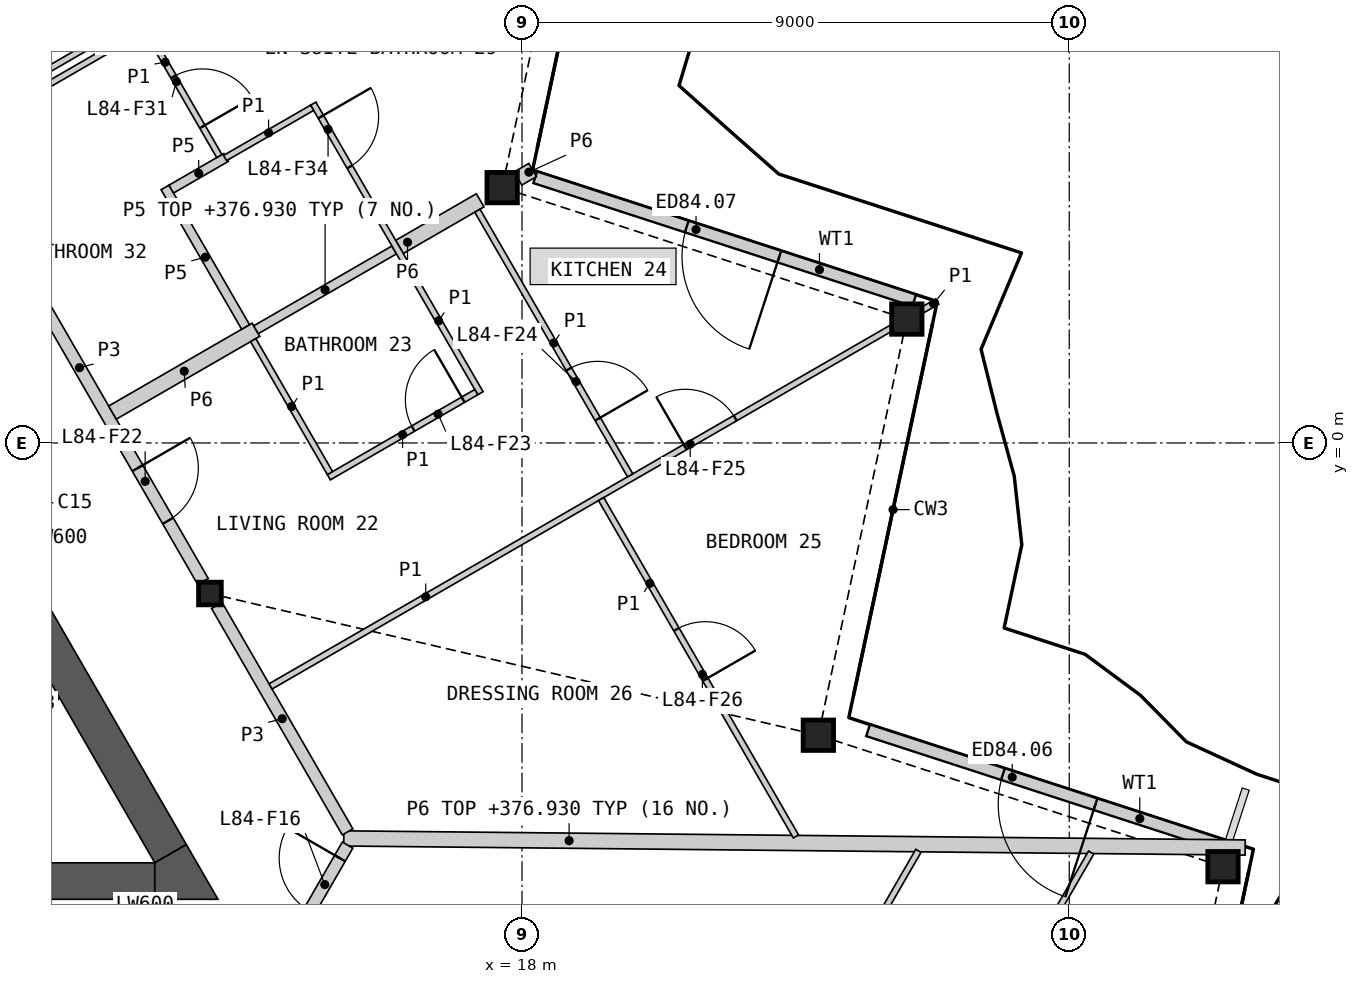
"""IFC4 building model, lengths in metres.
Left out: names, types, materials, properties, quantities, classifications, styles, units other than length and angle.
Written with IfcOpenShell. Run it as: python <this file> out.ifc"""

import sys

from ifc_helpers import new_model, si_unit, direction, frame, frame_2d, origin, origin_2d, place, context, subcontext, project, spatial, polyline, rectangle, hollow_rectangle, i_section, outline, extrude, element, fill, save


model = new_model("IFC4")
c1 = context("Model", 3, precision=1e-05, world=origin(), true_north=direction((0.0, 1.0)))
c2 = subcontext(c1, "Body", "Model", "MODEL_VIEW")
j1 = project(units=[si_unit("LENGTHUNIT", "METRE"), si_unit("PLANEANGLEUNIT", "RADIAN")], contexts=[c1])
p1 = place(None, origin())
s1 = spatial("IfcSite", under=j1, at=p1, CompositionType="ELEMENT")
p2 = place(p1, origin())
s2 = spatial("IfcBuilding", under=s1, at=p2, CompositionType="ELEMENT")
p3 = place(p2, frame((0.0, 0.0, 374.6)))
s3 = spatial("IfcBuildingStorey", under=s2, at=p3, CompositionType="ELEMENT", Elevation=374.6)
for number, where, z_axis, x_axis in (
    (1, (29.529, -6.969, 0.0), (0.0, 0.0, 1.0), (1.0, 0.0, 0.0)),
    (2, (22.874, -4.807, 0.0), (0.0, 0.0, 1.0), (1.0, 0.0, 0.0)),
    (3, (24.329, 2.037, 0.0), (0.0, 0.0, 1.0), (1.0, 0.0, 0.0)),
    (4, (17.674, 4.199, 0.0), (0.0, 0.0, 1.0), (1.0, 0.0, 0.0)),
):
    element("IfcColumn", number, at=place(p3, frame(where, z_axis=z_axis, x_axis=x_axis)), inside=s3, PredefinedType="COLUMN", context=c2, shape_type="SweptSolid", body=[
        extrude(hollow_rectangle(XDim=0.5, YDim=0.5, WallThickness=0.03, at=origin_2d()), origin(), (0.0, 0.0, 1.0), 3.4),
    ])
p4 = place(p3, frame((12.868, -2.476, 0.0), z_axis=(0.0, 0.0, 1.0), x_axis=(1.0, 0.0, 0.0)))
e5 = element("IfcColumn", 5, at=p4, inside=s3, PredefinedType="COLUMN", context=c2, shape_type="SweptSolid", body=[
    extrude(i_section(OverallWidth=0.374, OverallDepth=0.372, WebThickness=0.016, FlangeThickness=0.026, at=origin_2d()), origin(), (0.0, 0.0, 1.0), 3.4),
])
p5 = place(p3, frame((29.65, -6.663, 0.0), z_axis=(0.0, 0.0, 1.0), x_axis=(-0.951056402988, 0.3090173431, 0.0)))
e6 = element("IfcWall", 6, at=p5, inside=s3, PredefinedType="SOLIDWALL", context=c2, shape_type="SweptSolid", body=[
    extrude(rectangle(XDim=6.265, YDim=0.2, at=frame_2d((3.133, 0.0))), origin(), (0.0, 0.0, 1.0), 2.634),
])
p6 = place(p5, frame((2.333, 0.0, 0.0)))
e7 = element("IfcOpeningElement", 7, at=p6, cuts=e6, PredefinedType="OPENING", context=c2, shape_type="SweptSolid", body=[
    extrude(rectangle(XDim=1.6, YDim=2.25, at=frame_2d((0.8, 1.125))), frame((0.0, 0.11, 0.0), z_axis=(0.0, -1.0, 0.0), x_axis=(1.0, 0.0, 0.0)), (0.0, 0.0, 1.0), 0.22),
])
p7 = place(p3, frame((24.45, 2.344, 0.0), z_axis=(0.0, 0.0, 1.0), x_axis=(-0.951062538214, 0.308998460199, 0.0)))
e8 = element("IfcWall", 8, at=p7, inside=s3, PredefinedType="SOLIDWALL", context=c2, shape_type="SweptSolid", body=[
    extrude(rectangle(XDim=6.553, YDim=0.2, at=frame_2d((3.277, 0.0))), origin(), (0.0, 0.0, 1.0), 2.634),
])
p8 = place(p7, frame((2.333, 0.0, 0.0)))
e9 = element("IfcOpeningElement", 9, at=p8, cuts=e8, PredefinedType="OPENING", context=c2, shape_type="SweptSolid", body=[
    extrude(rectangle(XDim=1.6, YDim=2.25, at=frame_2d((0.8, 1.125))), frame((0.0, 0.11, 0.0), z_axis=(0.0, -1.0, 0.0), x_axis=(1.0, 0.0, 0.0)), (0.0, 0.0, 1.0), 0.22),
])
p9 = place(p3, origin())
e10 = element("IfcWall", 10, at=p9, inside=s3, PredefinedType="SHEAR", context=c2, shape_type="SweptSolid", body=[
    extrude(outline(polyline([(8.83, -6.881), (10.374, -4.206), (10.032, -4.298), (8.738, -6.539), (8.83, -6.881)])), origin(), (0.0, 0.0, 1.0), 3.1),
])
p10 = place(p3, origin())
e11 = element("IfcWall", 11, at=p10, inside=s3, PredefinedType="SHEAR", context=c2, shape_type="SweptSolid", body=[
    extrude(outline(polyline([(10.032, -4.298), (10.374, -4.206), (5.307, -1.281), (5.182, -1.498), (10.032, -4.298)])), origin(), (0.0, 0.0, 1.0), 3.1),
])
p11 = place(p3, frame((-4.892, -7.206, 0.0), z_axis=(0.0, 0.0, 1.0), x_axis=(1.0, 0.0, 0.0)))
e12 = element("IfcWall", 12, at=p11, inside=s3, PredefinedType="SHEAR", context=c2, shape_type="SweptSolid", body=[
    extrude(rectangle(XDim=16.853, YDim=0.6, at=frame_2d((8.426, 0.0))), origin(), (0.0, 0.0, 1.0), 3.1),
])
p12 = place(p3, frame((12.221, -6.756, 0.0), z_axis=(0.0, 0.0, 1.0), x_axis=(-0.50000604952, 0.866021911064, 0.0)))
e13 = element("IfcWall", 13, at=p12, inside=s3, PredefinedType="SHEAR", context=c2, shape_type="SweptSolid", body=[
    extrude(rectangle(XDim=4.869, YDim=0.6, at=frame_2d((2.434, 0.0))), origin(), (0.0, 0.0, 1.0), 3.1),
])
p13 = place(p3, origin())
e14 = element("IfcWall", 14, at=p13, inside=s3, PredefinedType="SHEAR", context=c2, shape_type="SweptSolid", body=[
    extrude(outline(polyline([(11.961, -7.506), (11.961, -6.906), (12.48, -6.606), (13.0, -7.506), (11.961, -7.506)])), origin(), (0.0, 0.0, 1.0), 3.1),
])
p14 = place(p3, frame((15.069, -6.504, 0.0), z_axis=(0.0, 0.0, 1.0), x_axis=(0.999949045807, -0.01009483976, 0.0)))
e15 = element("IfcWall", 15, at=p14, inside=s3, PredefinedType="PARTITIONING", context=c2, shape_type="SweptSolid", body=[
    extrude(rectangle(XDim=14.825, YDim=0.25, at=frame_2d((7.413, 0.0))), origin(), (0.0, 0.0, 1.0), 2.33),
])
p15 = place(p3, frame((8.692, 4.756, 0.0), z_axis=(0.0, 0.0, 1.0), x_axis=(0.500001682468, -0.866024432409, 0.0)))
e16 = element("IfcWall", 16, at=p15, inside=s3, PredefinedType="PARTITIONING", context=c2, shape_type="SweptSolid", body=[
    extrude(rectangle(XDim=8.124, YDim=0.2, at=frame_2d((4.062, 0.0))), origin(), (0.0, 0.0, 1.0), 3.1),
])
p16 = place(p15, frame((5.97, 0.0, 0.0)))
e17 = element("IfcOpeningElement", 17, at=p16, cuts=e16, PredefinedType="OPENING", context=c2, shape_type="SweptSolid", body=[
    extrude(rectangle(XDim=1.0, YDim=2.1, at=frame_2d((0.5, 1.05))), frame((0.0, 0.11, 0.0), z_axis=(0.0, -1.0, 0.0), x_axis=(1.0, 0.0, 0.0)), (0.0, 0.0, 1.0), 0.22),
])
p17 = place(p3, frame((12.981, -2.673, 0.0), z_axis=(0.0, 0.0, 1.0), x_axis=(0.499986217557, -0.866033360935, 0.0)))
e18 = element("IfcWall", 18, at=p17, inside=s3, PredefinedType="PARTITIONING", context=c2, shape_type="SweptSolid", body=[
    extrude(rectangle(XDim=4.3, YDim=0.2, at=frame_2d((2.15, 0.0))), origin(), (0.0, 0.0, 1.0), 3.1),
])
p18 = place(p3, frame((13.293, -9.797, 0.0), z_axis=(0.0, 0.0, 1.0), x_axis=(0.499967746641, 0.866044024469, 0.0)))
e19 = element("IfcWall", 19, at=p18, inside=s3, PredefinedType="PARTITIONING", context=c2, shape_type="SweptSolid", body=[
    extrude(rectangle(XDim=3.676, YDim=0.2, at=frame_2d((1.838, 0.0))), origin(), (0.0, 0.0, 1.0), 3.1),
])
p19 = place(p18, frame((2.426, 0.0, 0.0)))
e20 = element("IfcOpeningElement", 20, at=p19, cuts=e19, PredefinedType="OPENING", context=c2, shape_type="SweptSolid", body=[
    extrude(rectangle(XDim=1.0, YDim=2.1, at=frame_2d((0.5, 1.05))), frame((0.0, 0.11, 0.0), z_axis=(0.0, -1.0, 0.0), x_axis=(1.0, 0.0, 0.0)), (0.0, 0.0, 1.0), 0.22),
])
p20 = place(p3, frame((11.265, 0.5, 0.0), z_axis=(0.0, 0.0, 1.0), x_axis=(0.866051307416, 0.49995513091, 0.0)))
e21 = element("IfcWall", 21, at=p20, inside=s3, PredefinedType="PARTITIONING", context=c2, shape_type="SweptSolid", body=[
    extrude(rectangle(XDim=2.725, YDim=0.25, at=frame_2d((1.362, 0.0))), origin(), (0.0, 0.0, 1.0), 2.33),
])
p21 = place(p3, frame((15.985, 3.224, 0.0), z_axis=(0.0, 0.0, 1.0), x_axis=(0.865989259495, 0.50006259852, 0.0)))
e22 = element("IfcWall", 22, at=p21, inside=s3, PredefinedType="PARTITIONING", context=c2, shape_type="SweptSolid", body=[
    extrude(rectangle(XDim=1.532, YDim=0.25, at=frame_2d((0.766, 0.0))), origin(), (0.0, 0.0, 1.0), 2.33),
])
p22 = place(p3, frame((17.934, 4.35, 0.0), z_axis=(0.0, 0.0, 1.0), x_axis=(0.866288059981, 0.499544789918, 0.0)))
e23 = element("IfcWall", 23, at=p22, inside=s3, PredefinedType="PARTITIONING", context=c2, shape_type="SweptSolid", body=[
    extrude(rectangle(XDim=0.278, YDim=0.25, at=frame_2d((0.139, 0.0))), origin(), (0.0, 0.0, 1.0), 2.33),
])
p23 = place(p3, frame((13.625, 1.862, 0.0), z_axis=(0.0, 0.0, 1.0), x_axis=(0.866013657776, 0.500020344131, 0.0)))
e24 = element("IfcWall", 24, at=p23, inside=s3, PredefinedType="PLUMBINGWALL", context=c2, shape_type="SweptSolid", body=[
    extrude(rectangle(XDim=2.625, YDim=0.15, at=frame_2d((1.312, 0.0))), origin(), (0.0, 0.0, 1.0), 2.33),
])
p24 = place(p3, frame((12.129, 4.203, 0.0), z_axis=(0.0, 0.0, 1.0), x_axis=(0.499993606316, -0.866029095148, 0.0)))
e25 = element("IfcWall", 25, at=p24, inside=s3, PredefinedType="PLUMBINGWALL", context=c2, shape_type="SweptSolid", body=[
    extrude(rectangle(XDim=2.65, YDim=0.15, at=frame_2d((1.325, 0.0))), origin(), (0.0, 0.0, 1.0), 2.33),
])
p25 = place(p3, frame((12.232, 4.175, 0.0), z_axis=(0.0, 0.0, 1.0), x_axis=(0.866056787991, 0.499945637019, 0.0)))
e26 = element("IfcWall", 26, at=p25, inside=s3, PredefinedType="PLUMBINGWALL", context=c2, shape_type="SweptSolid", body=[
    extrude(rectangle(XDim=1.042, YDim=0.15, at=frame_2d((0.521, 0.0))), origin(), (0.0, 0.0, 1.0), 2.33),
])
p26 = place(p3, frame((13.865, -4.004, 0.0), z_axis=(0.0, 0.0, 1.0), x_axis=(0.866023404247, 0.500003463284, 0.0)))
e27 = element("IfcWall", 27, at=p26, inside=s3, PredefinedType="PARTITIONING", context=c2, shape_type="SweptSolid", body=[
    extrude(rectangle(XDim=11.782, YDim=0.1, at=frame_2d((5.891, 0.0))), origin(), (0.0, 0.0, 1.0), 2.33),
])
p27 = place(p26, frame((7.874, 0.0, 0.0)))
e28 = element("IfcOpeningElement", 28, at=p27, cuts=e27, PredefinedType="OPENING", context=c2, shape_type="SweptSolid", body=[
    extrude(rectangle(XDim=0.95, YDim=2.1, at=frame_2d((0.475, 1.05))), frame((0.0, 0.06, 0.0), z_axis=(0.0, -1.0, 0.0), x_axis=(1.0, 0.0, 0.0)), (0.0, 0.0, 1.0), 0.12),
])
p28 = place(p3, frame((8.775, 5.066, 0.0), z_axis=(0.0, 0.0, 1.0), x_axis=(0.866023724155, 0.500002909193, 0.0)))
e29 = element("IfcWall", 29, at=p28, inside=s3, PredefinedType="PARTITIONING", context=c2, shape_type="SweptSolid", body=[
    extrude(rectangle(XDim=11.655, YDim=0.1, at=frame_2d((5.827, 0.0))), origin(), (0.0, 0.0, 1.0), 2.33),
])
p29 = place(p28, frame((3.751, 0.0, 0.0)))
e30 = element("IfcOpeningElement", 30, at=p29, cuts=e29, PredefinedType="OPENING", context=c2, shape_type="SweptSolid", body=[
    extrude(rectangle(XDim=0.95, YDim=2.1, at=frame_2d((0.475, 1.05))), frame((0.0, 0.06, 0.0), z_axis=(0.0, -1.0, 0.0), x_axis=(1.0, 0.0, 0.0)), (0.0, 0.0, 1.0), 0.12),
])
p30 = place(p3, frame((23.463, -13.488, 0.0), z_axis=(0.0, 0.0, 1.0), x_axis=(0.500012519194, 0.866018175704, 0.0)))
e31 = element("IfcWall", 31, at=p30, inside=s3, PredefinedType="PARTITIONING", context=c2, shape_type="SweptSolid", body=[
    extrude(rectangle(XDim=7.796, YDim=0.1, at=frame_2d((3.898, 0.0))), origin(), (0.0, 0.0, 1.0), 2.33),
])
p31 = place(p30, frame((3.473, 0.0, 0.0)))
e32 = element("IfcOpeningElement", 32, at=p31, cuts=e31, PredefinedType="OPENING", context=c2, shape_type="SweptSolid", body=[
    extrude(rectangle(XDim=0.95, YDim=2.1, at=frame_2d((0.475, 1.05))), frame((0.0, 0.06, 0.0), z_axis=(0.0, -1.0, 0.0), x_axis=(1.0, 0.0, 0.0)), (0.0, 0.0, 1.0), 0.12),
])
p32 = place(p3, frame((19.302, -0.923, 0.0), z_axis=(0.0, 0.0, 1.0), x_axis=(0.499999516514, -0.866025682925, 0.0)))
e33 = element("IfcWall", 33, at=p32, inside=s3, PredefinedType="PARTITIONING", context=c2, shape_type="SweptSolid", body=[
    extrude(rectangle(XDim=6.407, YDim=0.1, at=frame_2d((3.204, 0.0))), origin(), (0.0, 0.0, 1.0), 2.33),
])
p33 = place(p32, frame((2.476, 0.0, 0.0)))
e34 = element("IfcOpeningElement", 34, at=p33, cuts=e33, PredefinedType="OPENING", context=c2, shape_type="SweptSolid", body=[
    extrude(rectangle(XDim=0.95, YDim=2.1, at=frame_2d((0.475, 1.05))), frame((0.0, 0.06, 0.0), z_axis=(0.0, -1.0, 0.0), x_axis=(1.0, 0.0, 0.0)), (0.0, 0.0, 1.0), 0.12),
])
p34 = place(p3, frame((21.319, -12.251, 0.0), z_axis=(0.0, 0.0, 1.0), x_axis=(0.499999833739, 0.866025499775, 0.0)))
e35 = element("IfcWall", 35, at=p34, inside=s3, PredefinedType="PARTITIONING", context=c2, shape_type="SweptSolid", body=[
    extrude(rectangle(XDim=6.4, YDim=0.1, at=frame_2d((3.2, 0.0))), origin(), (0.0, 0.0, 1.0), 2.33),
])
p35 = place(p34, frame((1.26, 0.0, 0.0)))
e36 = element("IfcOpeningElement", 36, at=p35, cuts=e35, PredefinedType="OPENING", context=c2, shape_type="SweptSolid", body=[
    extrude(rectangle(XDim=0.95, YDim=2.1, at=frame_2d((0.475, 1.05))), frame((0.0, 0.06, 0.0), z_axis=(0.0, -1.0, 0.0), x_axis=(1.0, 0.0, 0.0)), (0.0, 0.0, 1.0), 0.12),
])
p36 = place(p3, frame((14.567, 5.581, 0.0), z_axis=(0.0, 0.0, 1.0), x_axis=(0.499996545922, -0.866027397988, 0.0)))
e37 = element("IfcWall", 37, at=p36, inside=s3, PredefinedType="PARTITIONING", context=c2, shape_type="SweptSolid", body=[
    extrude(rectangle(XDim=5.5, YDim=0.1, at=frame_2d((2.75, 0.0))), origin(), (0.0, 0.0, 1.0), 2.33),
])
p37 = place(p36, frame((0.25, 0.0, 0.0)))
e38 = element("IfcOpeningElement", 38, at=p37, cuts=e37, PredefinedType="OPENING", context=c2, shape_type="SweptSolid", body=[
    extrude(rectangle(XDim=0.95, YDim=2.1, at=frame_2d((0.475, 1.05))), frame((0.0, 0.06, 0.0), z_axis=(0.0, -1.0, 0.0), x_axis=(1.0, 0.0, 0.0)), (0.0, 0.0, 1.0), 0.12),
])
p38 = place(p3, frame((17.266, 3.82, 0.0), z_axis=(0.0, 0.0, 1.0), x_axis=(0.499990214365, -0.86603105345, 0.0)))
e39 = element("IfcWall", 39, at=p38, inside=s3, PredefinedType="PARTITIONING", context=c2, shape_type="SweptSolid", body=[
    extrude(rectangle(XDim=5.025, YDim=0.1, at=frame_2d((2.512, 0.0))), origin(), (0.0, 0.0, 1.0), 2.33),
])
p39 = place(p38, frame((3.008, 0.0, 0.0)))
e40 = element("IfcOpeningElement", 40, at=p39, cuts=e39, PredefinedType="OPENING", context=c2, shape_type="SweptSolid", body=[
    extrude(rectangle(XDim=0.95, YDim=2.1, at=frame_2d((0.475, 1.05))), frame((0.0, 0.06, 0.0), z_axis=(0.0, -1.0, 0.0), x_axis=(1.0, 0.0, 0.0)), (0.0, 0.0, 1.0), 0.12),
])
p40 = place(p3, frame((14.823, -0.564, 0.0), z_axis=(0.0, 0.0, 1.0), x_axis=(0.866034573852, 0.49998411664, 0.0)))
e41 = element("IfcWall", 41, at=p40, inside=s3, PredefinedType="PARTITIONING", context=c2, shape_type="SweptSolid", body=[
    extrude(rectangle(XDim=2.8, YDim=0.1, at=frame_2d((1.4, 0.0))), origin(), (0.0, 0.0, 1.0), 2.33),
])
p41 = place(p40, frame((1.6, 0.0, 0.0)))
e42 = element("IfcOpeningElement", 42, at=p41, cuts=e41, PredefinedType="OPENING", context=c2, shape_type="SweptSolid", body=[
    extrude(rectangle(XDim=0.95, YDim=2.1, at=frame_2d((0.475, 1.05))), frame((0.0, 0.06, 0.0), z_axis=(0.0, -1.0, 0.0), x_axis=(1.0, 0.0, 0.0)), (0.0, 0.0, 1.0), 0.12),
])
p42 = place(p3, frame((13.579, 1.691, 0.0), z_axis=(0.0, 0.0, 1.0), x_axis=(0.500048846702, -0.865997200291, 0.0)))
e43 = element("IfcWall", 43, at=p42, inside=s3, PredefinedType="PARTITIONING", context=c2, shape_type="SweptSolid", body=[
    extrude(rectangle(XDim=2.525, YDim=0.1, at=frame_2d((1.263, 0.0))), origin(), (0.0, 0.0, 1.0), 2.33),
])
p43 = place(p3, frame((8.488, 5.15, 0.0), z_axis=(0.0, 0.0, 1.0), x_axis=(0.866027727466, 0.499995975244, 0.0)))
e44 = element("IfcWall", 44, at=p43, inside=s3, PredefinedType="PARTITIONING", context=c2, shape_type="SweptSolid", body=[
    extrude(rectangle(XDim=2.73, YDim=0.1, at=frame_2d((1.365, 0.0))), origin(), (0.0, 0.0, 1.0), 2.33),
])
p44 = place(p3, frame((11.835, 6.775, 0.0), z_axis=(0.0, 0.0, 1.0), x_axis=(0.500030943131, -0.866007538022, 0.0)))
e45 = element("IfcWall", 45, at=p44, inside=s3, PredefinedType="PARTITIONING", context=c2, shape_type="SweptSolid", body=[
    extrude(rectangle(XDim=2.375, YDim=0.1, at=frame_2d((1.188, 0.0))), origin(), (0.0, 0.0, 1.0), 2.33),
])
p45 = place(p44, frame((0.867, 0.0, 0.0)))
e46 = element("IfcOpeningElement", 46, at=p45, cuts=e45, PredefinedType="OPENING", context=c2, shape_type="SweptSolid", body=[
    extrude(rectangle(XDim=0.95, YDim=2.1, at=frame_2d((0.475, 1.05))), frame((0.0, 0.06, 0.0), z_axis=(0.0, -1.0, 0.0), x_axis=(1.0, 0.0, 0.0)), (0.0, 0.0, 1.0), 0.12),
])
p46 = place(p3, frame((13.116, 4.686, 0.0), z_axis=(0.0, 0.0, 1.0), x_axis=(0.866072496716, 0.499918423778, 0.0)))
e47 = element("IfcWall", 47, at=p46, inside=s3, PredefinedType="PARTITIONING", context=c2, shape_type="SweptSolid", body=[
    extrude(rectangle(XDim=1.654, YDim=0.1, at=frame_2d((0.827, 0.0))), origin(), (0.0, 0.0, 1.0), 2.33),
])
p47 = place(p3, frame((24.589, 2.188, 0.0), z_axis=(0.0, 0.0, 1.0), x_axis=(0.866288059981, 0.499544789918, 0.0)))
e48 = element("IfcWall", 48, at=p47, inside=s3, PredefinedType="PARTITIONING", context=c2, shape_type="SweptSolid", body=[
    extrude(rectangle(XDim=0.278, YDim=0.1, at=frame_2d((0.139, 0.0))), origin(), (0.0, 0.0, 1.0), 2.33),
])
p48 = place(p6, origin())
e49 = element("IfcDoor", 49, at=p48, inside=s3, OperationType="DOUBLE_DOOR_SINGLE_SWING", PredefinedType="DOOR", context=c2, shape_type="SweptSolid", body=[
    extrude(rectangle(XDim=1.6, YDim=2.25, at=frame_2d((0.8, 1.125))), frame((0.0, 0.025, 0.0), z_axis=(0.0, -1.0, 0.0), x_axis=(1.0, 0.0, 0.0)), (0.0, 0.0, 1.0), 0.05),
])
fill(e7, e49)
p49 = place(p8, origin())
e50 = element("IfcDoor", 50, at=p49, inside=s3, OperationType="DOUBLE_DOOR_SINGLE_SWING", PredefinedType="DOOR", context=c2, shape_type="SweptSolid", body=[
    extrude(rectangle(XDim=1.6, YDim=2.25, at=frame_2d((0.8, 1.125))), frame((0.0, 0.025, 0.0), z_axis=(0.0, -1.0, 0.0), x_axis=(1.0, 0.0, 0.0)), (0.0, 0.0, 1.0), 0.05),
])
fill(e9, e50)
p50 = place(p19, origin())
e51 = element("IfcDoor", 51, at=p50, inside=s3, OperationType="SINGLE_SWING_RIGHT", PredefinedType="DOOR", context=c2, shape_type="SweptSolid", body=[
    extrude(rectangle(XDim=1.0, YDim=2.1, at=frame_2d((0.5, 1.05))), frame((0.0, 0.025, 0.0), z_axis=(0.0, -1.0, 0.0), x_axis=(1.0, 0.0, 0.0)), (0.0, 0.0, 1.0), 0.05),
])
fill(e20, e51)
p51 = place(p16, origin())
e52 = element("IfcDoor", 52, at=p51, inside=s3, OperationType="SINGLE_SWING_LEFT", PredefinedType="DOOR", context=c2, shape_type="SweptSolid", body=[
    extrude(rectangle(XDim=1.0, YDim=2.1, at=frame_2d((0.5, 1.05))), frame((0.0, 0.025, 0.0), z_axis=(0.0, -1.0, 0.0), x_axis=(1.0, 0.0, 0.0)), (0.0, 0.0, 1.0), 0.05),
])
fill(e17, e52)
p52 = place(p41, origin())
e53 = element("IfcDoor", 53, at=p52, inside=s3, OperationType="SINGLE_SWING_RIGHT", PredefinedType="DOOR", context=c2, shape_type="SweptSolid", body=[
    extrude(rectangle(XDim=0.95, YDim=2.1, at=frame_2d((0.475, 1.05))), frame((0.0, 0.025, 0.0), z_axis=(0.0, -1.0, 0.0), x_axis=(1.0, 0.0, 0.0)), (0.0, 0.0, 1.0), 0.05),
])
fill(e42, e53)
p53 = place(p39, origin())
e54 = element("IfcDoor", 54, at=p53, inside=s3, OperationType="SINGLE_SWING_RIGHT", PredefinedType="DOOR", context=c2, shape_type="SweptSolid", body=[
    extrude(rectangle(XDim=0.95, YDim=2.1, at=frame_2d((0.475, 1.05))), frame((0.0, 0.025, 0.0), z_axis=(0.0, -1.0, 0.0), x_axis=(1.0, 0.0, 0.0)), (0.0, 0.0, 1.0), 0.05),
])
fill(e40, e54)
p54 = place(p27, origin())
e55 = element("IfcDoor", 55, at=p54, inside=s3, OperationType="SINGLE_SWING_LEFT", PredefinedType="DOOR", context=c2, shape_type="SweptSolid", body=[
    extrude(rectangle(XDim=0.95, YDim=2.1, at=frame_2d((0.475, 1.05))), frame((0.0, 0.025, 0.0), z_axis=(0.0, -1.0, 0.0), x_axis=(1.0, 0.0, 0.0)), (0.0, 0.0, 1.0), 0.05),
])
fill(e28, e55)
p55 = place(p33, origin())
e56 = element("IfcDoor", 56, at=p55, inside=s3, OperationType="SINGLE_SWING_RIGHT", PredefinedType="DOOR", context=c2, shape_type="SweptSolid", body=[
    extrude(rectangle(XDim=0.95, YDim=2.1, at=frame_2d((0.475, 1.05))), frame((0.0, 0.025, 0.0), z_axis=(0.0, -1.0, 0.0), x_axis=(1.0, 0.0, 0.0)), (0.0, 0.0, 1.0), 0.05),
])
fill(e34, e56)
p56 = place(p45, origin())
e57 = element("IfcDoor", 57, at=p56, inside=s3, OperationType="SINGLE_SWING_RIGHT", PredefinedType="DOOR", context=c2, shape_type="SweptSolid", body=[
    extrude(rectangle(XDim=0.95, YDim=2.1, at=frame_2d((0.475, 1.05))), frame((0.0, 0.025, 0.0), z_axis=(0.0, -1.0, 0.0), x_axis=(1.0, 0.0, 0.0)), (0.0, 0.0, 1.0), 0.05),
])
fill(e46, e57)
p57 = place(p37, origin())
e58 = element("IfcDoor", 58, at=p57, inside=s3, OperationType="SINGLE_SWING_LEFT", PredefinedType="DOOR", context=c2, shape_type="SweptSolid", body=[
    extrude(rectangle(XDim=0.95, YDim=2.1, at=frame_2d((0.475, 1.05))), frame((0.0, 0.025, 0.0), z_axis=(0.0, -1.0, 0.0), x_axis=(1.0, 0.0, 0.0)), (0.0, 0.0, 1.0), 0.05),
])
fill(e38, e58)
save(model, sys.argv[1])
